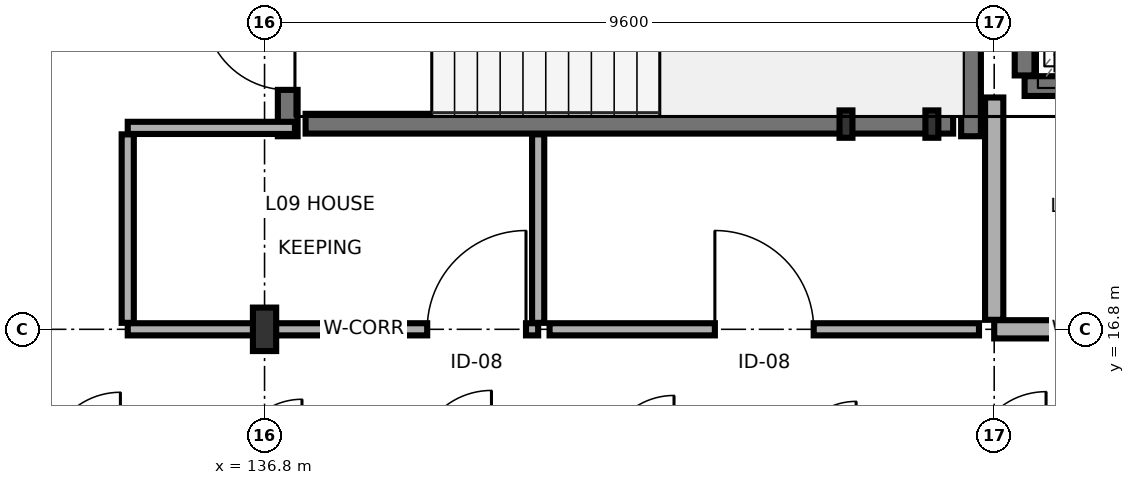
"""IFC4 building model, lengths in metres.
Left out: names, types, materials, properties, quantities, classifications, styles, units other than length and angle.
Written with IfcOpenShell. Run it as: python <this file> out.ifc"""

import sys

from ifc_helpers import new_model, si_unit, direction, frame, frame_2d, origin, origin_2d, place, context, subcontext, project, spatial, rectangle, i_section, extrude, element, fill, save


model = new_model("IFC4")
c1 = context("Model", 3, precision=1e-05, world=origin(), true_north=direction((0.0, 1.0)))
c2 = subcontext(c1, "Body", "Model", "MODEL_VIEW")
j1 = project(units=[si_unit("LENGTHUNIT", "METRE"), si_unit("PLANEANGLEUNIT", "RADIAN")], contexts=[c1])
p1 = place(None, origin())
s1 = spatial("IfcSite", under=j1, at=p1, CompositionType="ELEMENT")
p2 = place(p1, origin())
s2 = spatial("IfcBuilding", under=s1, at=p2, CompositionType="ELEMENT")
p3 = place(p2, frame((0.0, 0.0, 31.7)))
s3 = spatial("IfcBuildingStorey", under=s2, at=p3, CompositionType="ELEMENT", Elevation=31.7)
p4 = place(p3, frame((136.8, 16.8, 0.0), z_axis=(0.0, 0.0, 1.0), x_axis=(1.0, 0.0, 0.0)))
e1 = element("IfcColumn", 1, at=p4, inside=s3, PredefinedType="COLUMN", context=c2, shape_type="SweptSolid", body=[
    extrude(i_section(OverallWidth=0.306, OverallDepth=0.572, WebThickness=0.021, FlangeThickness=0.04, FilletRadius=0.027, at=origin_2d()), origin(), (0.0, 0.0, 1.0), 3.4),
])
for number, where, z_axis, x_axis in (
    (2, (144.45, 19.5, 0.0), (0.0, 0.0, 1.0), (1.0, 0.0, 0.0)),
    (3, (145.58, 19.5, 0.0), (0.0, 0.0, 1.0), (1.0, 0.0, 0.0)),
):
    element("IfcColumn", number, at=place(p3, frame(where, z_axis=z_axis, x_axis=x_axis)), inside=s3, PredefinedType="PILASTER", context=c2, shape_type="SweptSolid", body=[
        extrude(i_section(OverallWidth=0.17, OverallDepth=0.36, WebThickness=0.008, FlangeThickness=0.013, FilletRadius=0.018, at=origin_2d()), origin(), (0.0, 0.0, 1.0), 3.4),
    ])
p5 = place(p3, frame((137.105, 19.34, 0.0), z_axis=(0.0, 0.0, 1.0), x_axis=(0.0, 1.0, 0.0)))
e4 = element("IfcWall", 4, at=p5, inside=s3, PredefinedType="SHEAR", context=c2, shape_type="SweptSolid", body=[
    extrude(rectangle(XDim=4.27, YDim=0.26, at=frame_2d((2.135, 0.0))), origin(), (0.0, 0.0, 1.0), 3.17),
])
p6 = place(p5, frame((0.61, 0.0, 0.0)))
e5 = element("IfcOpeningElement", 5, at=p6, cuts=e4, PredefinedType="OPENING", context=c2, shape_type="SweptSolid", body=[
    extrude(rectangle(XDim=1.1, YDim=2.2, at=frame_2d((0.55, 1.1))), frame((0.0, 0.14, 0.0), z_axis=(0.0, -1.0, 0.0), x_axis=(1.0, 0.0, 0.0)), (0.0, 0.0, 1.0), 0.28),
])
p7 = place(p3, frame((146.095, 19.34, 0.0), z_axis=(0.0, 0.0, 1.0), x_axis=(0.0, 1.0, 0.0)))
e6 = element("IfcWall", 6, at=p7, inside=s3, PredefinedType="SHEAR", context=c2, shape_type="SweptSolid", body=[
    extrude(rectangle(XDim=4.27, YDim=0.26, at=frame_2d((2.135, 0.0))), origin(), (0.0, 0.0, 1.0), 3.17),
])
p8 = place(p3, frame((137.34, 19.505, 0.0), z_axis=(0.0, 0.0, 1.0), x_axis=(1.0, 0.0, 0.0)))
e7 = element("IfcWall", 7, at=p8, inside=s3, PredefinedType="SHEAR", context=c2, shape_type="SweptSolid", body=[
    extrude(rectangle(XDim=8.52, YDim=0.26, at=frame_2d((4.26, 0.0))), origin(), (0.0, 0.0, 1.0), 3.17),
])
p9 = place(p3, frame((146.8, 20.0, 0.0), z_axis=(0.0, 0.0, 1.0), x_axis=(1.0, 0.0, 0.0)))
e8 = element("IfcWall", 8, at=p9, inside=s3, PredefinedType="SHEAR", context=c2, shape_type="SweptSolid", body=[
    extrude(rectangle(XDim=2.4, YDim=0.26, at=frame_2d((1.2, 0.0))), origin(), (0.0, 0.0, 1.0), 3.17),
])
p10 = place(p9, frame((0.55, 0.0, 0.0)))
e9 = element("IfcOpeningElement", 9, at=p10, cuts=e8, PredefinedType="OPENING", context=c2, shape_type="SweptSolid", body=[
    extrude(rectangle(XDim=1.3, YDim=2.25, at=frame_2d((0.65, 1.125))), frame((0.0, 0.14, 0.0), z_axis=(0.0, -1.0, 0.0), x_axis=(1.0, 0.0, 0.0)), (0.0, 0.0, 1.0), 0.28),
])
p11 = place(p3, frame((146.8, 20.14, 0.0), z_axis=(0.0, 0.0, 1.0), x_axis=(0.0, 1.0, 0.0)))
e10 = element("IfcWall", 10, at=p11, inside=s3, PredefinedType="SHEAR", context=c2, shape_type="SweptSolid", body=[
    extrude(rectangle(XDim=2.52, YDim=0.26, at=frame_2d((1.26, 0.0))), origin(), (0.0, 0.0, 1.0), 3.17),
])
p12 = place(p3, frame((146.4, 16.8, 0.0), z_axis=(0.0, 0.0, 1.0), x_axis=(1.0, 0.0, 0.0)))
e11 = element("IfcWall", 11, at=p12, inside=s3, PredefinedType="SOLIDWALL", context=c2, shape_type="SweptSolid", body=[
    extrude(rectangle(XDim=7.0, YDim=0.24, at=frame_2d((3.5, 0.0))), origin(), (0.0, 0.0, 1.0), 2.705),
])
p13 = place(p12, frame((2.7, 0.0, 0.0)))
e12 = element("IfcOpeningElement", 12, at=p13, cuts=e11, PredefinedType="OPENING", context=c2, shape_type="SweptSolid", body=[
    extrude(rectangle(XDim=1.6, YDim=2.2, at=frame_2d((0.8, 1.1))), frame((0.0, 0.13, 0.0), z_axis=(0.0, -1.0, 0.0), x_axis=(1.0, 0.0, 0.0)), (0.0, 0.0, 1.0), 0.26),
])
p14 = place(p3, frame((146.4, 16.925, 0.0), z_axis=(0.0, 0.0, 1.0), x_axis=(0.0, 1.0, 0.0)))
e13 = element("IfcWall", 13, at=p14, inside=s3, PredefinedType="SOLIDWALL", context=c2, shape_type="SweptSolid", body=[
    extrude(rectangle(XDim=2.925, YDim=0.24, at=frame_2d((1.462, 0.0))), origin(), (0.0, 0.0, 1.0), 2.705),
])
p15 = place(p3, frame((135.0, 16.8, 0.0), z_axis=(0.0, 0.0, 1.0), x_axis=(1.0, 0.0, 0.0)))
e14 = element("IfcWall", 14, at=p15, inside=s3, PredefinedType="PARTITIONING", context=c2, shape_type="SweptSolid", body=[
    extrude(rectangle(XDim=5.4, YDim=0.16, at=frame_2d((2.7, 0.0))), origin(), (0.0, 0.0, 1.0), 2.705),
])
p16 = place(p15, frame((3.94, 0.0, 0.0)))
e15 = element("IfcOpeningElement", 15, at=p16, cuts=e14, PredefinedType="OPENING", context=c2, shape_type="SweptSolid", body=[
    extrude(rectangle(XDim=1.3, YDim=2.2, at=frame_2d((0.65, 1.1))), frame((0.0, 0.09, 0.0), z_axis=(0.0, -1.0, 0.0), x_axis=(1.0, 0.0, 0.0)), (0.0, 0.0, 1.0), 0.18),
])
p17 = place(p3, frame((135.0, 16.885, 0.0), z_axis=(0.0, 0.0, 1.0), x_axis=(0.0, 1.0, 0.0)))
e16 = element("IfcWall", 16, at=p17, inside=s3, PredefinedType="PARTITIONING", context=c2, shape_type="SweptSolid", body=[
    extrude(rectangle(XDim=2.48, YDim=0.16, at=frame_2d((1.24, 0.0))), origin(), (0.0, 0.0, 1.0), 2.755),
])
p18 = place(p3, frame((140.4, 16.885, 0.0), z_axis=(0.0, 0.0, 1.0), x_axis=(0.0, 1.0, 0.0)))
e17 = element("IfcWall", 17, at=p18, inside=s3, PredefinedType="PARTITIONING", context=c2, shape_type="SweptSolid", body=[
    extrude(rectangle(XDim=2.48, YDim=0.16, at=frame_2d((1.24, 0.0))), origin(), (0.0, 0.0, 1.0), 2.705),
])
p19 = place(p3, frame((135.0, 19.45, 0.0), z_axis=(0.0, 0.0, 1.0), x_axis=(1.0, 0.0, 0.0)))
e18 = element("IfcWall", 18, at=p19, inside=s3, PredefinedType="PARTITIONING", context=c2, shape_type="SweptSolid", body=[
    extrude(rectangle(XDim=2.2, YDim=0.16, at=frame_2d((1.1, 0.0))), origin(), (0.0, 0.0, 1.0), 2.705),
])
p20 = place(p3, frame((140.55, 16.8, 0.0), z_axis=(0.0, 0.0, 1.0), x_axis=(1.0, 0.0, 0.0)))
e19 = element("IfcWall", 19, at=p20, inside=s3, PredefinedType="PARTITIONING", context=c2, shape_type="SweptSolid", body=[
    extrude(rectangle(XDim=5.65, YDim=0.16, at=frame_2d((2.825, 0.0))), origin(), (0.0, 0.0, 1.0), 2.705),
])
p21 = place(p20, frame((2.175, 0.0, 0.0)))
e20 = element("IfcOpeningElement", 20, at=p21, cuts=e19, PredefinedType="OPENING", context=c2, shape_type="SweptSolid", body=[
    extrude(rectangle(XDim=1.3, YDim=2.2, at=frame_2d((0.65, 1.1))), frame((0.0, 0.09, 0.0), z_axis=(0.0, -1.0, 0.0), x_axis=(1.0, 0.0, 0.0)), (0.0, 0.0, 1.0), 0.18),
])
p22 = place(p6, origin())
e21 = element("IfcDoor", 21, at=p22, inside=s3, OperationType="SINGLE_SWING_RIGHT", PredefinedType="DOOR", context=c2, shape_type="SweptSolid", body=[
    extrude(rectangle(XDim=1.1, YDim=2.2, at=frame_2d((0.55, 1.1))), frame((0.0, 0.025, 0.0), z_axis=(0.0, -1.0, 0.0), x_axis=(1.0, 0.0, 0.0)), (0.0, 0.0, 1.0), 0.05),
])
fill(e5, e21)
p23 = place(p16, origin())
e22 = element("IfcDoor", 22, at=p23, inside=s3, OperationType="SINGLE_SWING_RIGHT", PredefinedType="DOOR", context=c2, shape_type="SweptSolid", body=[
    extrude(rectangle(XDim=1.3, YDim=2.2, at=frame_2d((0.65, 1.1))), frame((0.0, 0.025, 0.0), z_axis=(0.0, -1.0, 0.0), x_axis=(1.0, 0.0, 0.0)), (0.0, 0.0, 1.0), 0.05),
])
fill(e15, e22)
p24 = place(p21, origin())
e23 = element("IfcDoor", 23, at=p24, inside=s3, OperationType="SINGLE_SWING_LEFT", PredefinedType="DOOR", context=c2, shape_type="SweptSolid", body=[
    extrude(rectangle(XDim=1.3, YDim=2.2, at=frame_2d((0.65, 1.1))), frame((0.0, 0.025, 0.0), z_axis=(0.0, -1.0, 0.0), x_axis=(1.0, 0.0, 0.0)), (0.0, 0.0, 1.0), 0.05),
])
fill(e20, e23)
save(model, sys.argv[1])
